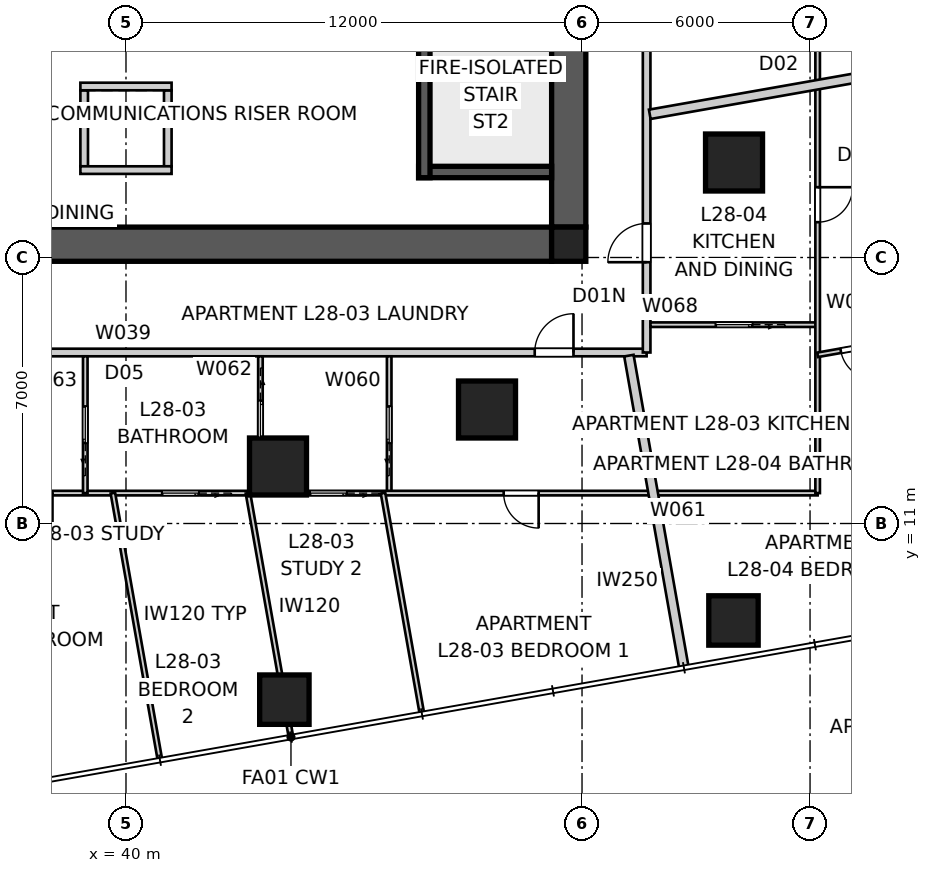
"""IFC4 building model, lengths in metres.
Left out: names, types, materials, properties, quantities, classifications, styles, units other than length and angle.
Written with IfcOpenShell. Run it as: python <this file> out.ifc"""

import sys

from ifc_helpers import new_model, si_unit, direction, frame, frame_2d, origin, origin_2d, place, context, subcontext, project, spatial, polyline, rectangle, outline, extrude, element, fill, save


model = new_model("IFC4")
c1 = context("Model", 3, precision=1e-05, world=origin(), true_north=direction((0.0, 1.0)))
c2 = subcontext(c1, "Body", "Model", "MODEL_VIEW")
j1 = project(units=[si_unit("LENGTHUNIT", "METRE"), si_unit("PLANEANGLEUNIT", "RADIAN")], contexts=[c1])
p1 = place(None, origin())
s1 = spatial("IfcSite", under=j1, at=p1, CompositionType="ELEMENT")
p2 = place(p1, origin())
s2 = spatial("IfcBuilding", under=s1, at=p2, CompositionType="ELEMENT")
p3 = place(p2, frame((0.0, 0.0, 103.2)))
s3 = spatial("IfcBuildingStorey", under=s2, at=p3, CompositionType="ELEMENT", Elevation=103.2)
p4 = place(p3, frame((51.2, 18.35, 0.0), z_axis=(0.0, 0.0, 1.0), x_axis=(-1.0, 0.0, 0.0)))
e1 = element("IfcWall", 1, at=p4, inside=s3, PredefinedType="SHEAR", context=c2, shape_type="SweptSolid", body=[
    extrude(outline(polyline([(0.0, -0.45), (22.4, -0.45), (22.4, -0.025), (22.85, -0.025), (22.85, 0.025), (22.4, 0.025), (22.4, 0.45), (0.0, 0.45), (0.0, 0.025), (-0.45, 0.025), (-0.45, -0.025), (0.0, -0.025), (0.0, -0.45)])), origin(), (0.0, 0.0, 1.0), 3.4),
])
p5 = place(p3, frame((51.65, 18.8, 0.0), z_axis=(0.0, 0.0, 1.0), x_axis=(0.0, 1.0, 0.0)))
e2 = element("IfcWall", 2, at=p5, inside=s3, PredefinedType="SHEAR", context=c2, shape_type="SweptSolid", body=[
    extrude(outline(polyline([(0.0, -0.45), (22.4, -0.45), (22.4, -0.025), (22.85, -0.025), (22.85, 0.025), (22.4, 0.025), (22.4, 0.45), (0.0, 0.45), (0.0, 0.025), (-0.45, 0.025), (-0.45, -0.025), (0.0, -0.025), (0.0, -0.45)])), origin(), (0.0, 0.0, 1.0), 3.4),
])
p6 = place(p5, frame((11.14, 0.0, 0.0)))
e3 = element("IfcOpeningElement", 3, at=p6, cuts=e2, PredefinedType="OPENING", context=c2, shape_type="SweptSolid", body=[
    extrude(rectangle(XDim=1.02, YDim=2.4, at=frame_2d((0.51, 1.2))), frame((0.0, 0.46, 0.0), z_axis=(0.0, -1.0, 0.0), x_axis=(1.0, 0.0, 0.0)), (0.0, 0.0, 1.0), 0.92),
])
p7 = place(p3, frame((47.85, 27.8, 0.0), z_axis=(0.0, 0.0, 1.0), x_axis=(0.0, -1.0, 0.0)))
e4 = element("IfcWall", 4, at=p7, inside=s3, PredefinedType="SHEAR", context=c2, shape_type="SweptSolid", body=[
    extrude(rectangle(XDim=7.7, YDim=0.3, at=frame_2d((3.85, 0.0))), origin(), (0.0, 0.0, 1.0), 3.4),
])
p8 = place(p3, frame((51.2, 20.25, 0.0), z_axis=(0.0, 0.0, 1.0), x_axis=(-1.0, 0.0, 0.0)))
e5 = element("IfcWall", 5, at=p8, inside=s3, PredefinedType="SHEAR", context=c2, shape_type="SweptSolid", body=[
    extrude(rectangle(XDim=3.5, YDim=0.3, at=frame_2d((1.75, 0.0))), origin(), (0.0, 0.0, 1.0), 3.4),
])
for number, where, z_axis, x_axis in (
    (6, (38.9, 22.4, 0.0), (0.0, 0.0, 1.0), (0.0, -1.0, 0.0)),
    (7, (41.1, 22.4, 0.0), (0.0, 0.0, 1.0), (0.0, -1.0, 0.0)),
):
    element("IfcWall", number, at=place(p3, frame(where, z_axis=z_axis, x_axis=x_axis)), inside=s3, PredefinedType="SOLIDWALL", context=c2, shape_type="SweptSolid", body=[
        extrude(rectangle(XDim=2.0, YDim=0.2, at=frame_2d((1.0, 0.0))), origin(), (0.0, 0.0, 1.0), 3.4),
    ])
for number, where, z_axis, x_axis in (
    (8, (38.8, 22.5, 0.0), (0.0, 0.0, 1.0), (1.0, 0.0, 0.0)),
    (9, (38.8, 20.3, 0.0), (0.0, 0.0, 1.0), (1.0, 0.0, 0.0)),
):
    element("IfcWall", number, at=place(p3, frame(where, z_axis=z_axis, x_axis=x_axis)), inside=s3, PredefinedType="SOLIDWALL", context=c2, shape_type="SweptSolid", body=[
        extrude(rectangle(XDim=2.4, YDim=0.2, at=frame_2d((1.2, 0.0))), origin(), (0.0, 0.0, 1.0), 3.4),
    ])
p9 = place(p3, frame((51.65, 18.35, 0.0), z_axis=(0.0, 0.0, 1.0), x_axis=(1.0, 0.0, 0.0)))
e10 = element("IfcColumn", 10, at=p9, inside=s3, PredefinedType="COLUMN", context=c2, shape_type="SweptSolid", body=[
    extrude(rectangle(XDim=0.9, YDim=0.9, at=origin_2d()), origin(), (0.0, 0.0, 1.0), 3.4),
])
for number, where, z_axis, x_axis in (
    (11, (44.167, 6.365, 0.0), (0.0, 0.0, 1.0), (1.0, 0.0, 0.0)),
    (12, (55.985, 8.448, 0.0), (0.0, 0.0, 1.0), (1.0, 0.0, 0.0)),
):
    element("IfcColumn", number, at=place(p3, frame(where, z_axis=z_axis, x_axis=x_axis)), inside=s3, PredefinedType="COLUMN", context=c2, shape_type="SweptSolid", body=[
        extrude(rectangle(XDim=1.3, YDim=1.3, at=origin_2d()), origin(), (0.0, 0.0, 1.0), 3.2),
    ])
for number, where, z_axis, x_axis in (
    (13, (44.0, 12.5, 0.0), (0.0, 0.0, 1.0), (1.0, 0.0, 0.0)),
    (14, (49.5, 14.0, 0.0), (0.0, 0.0, 1.0), (1.0, 0.0, 0.0)),
    (15, (56.0, 20.5, 0.0), (0.0, 0.0, 1.0), (1.0, 0.0, 0.0)),
):
    element("IfcColumn", number, at=place(p3, frame(where, z_axis=z_axis, x_axis=x_axis)), inside=s3, PredefinedType="COLUMN", context=c2, shape_type="SweptSolid", body=[
        extrude(rectangle(XDim=1.5, YDim=1.5, at=origin_2d()), origin(), (0.0, 0.0, 1.0), 3.4),
    ])
p10 = place(p3, frame((26.3, 15.5, 0.0), z_axis=(0.0, 0.0, 1.0), x_axis=(1.0, 0.0, 0.0)))
e16 = element("IfcWall", 16, at=p10, inside=s3, PredefinedType="PARTITIONING", context=c2, shape_type="SweptSolid", body=[
    extrude(rectangle(XDim=27.4, YDim=0.2, at=frame_2d((13.7, 0.0))), origin(), (0.0, 0.0, 1.0), 3.2),
])
p11 = place(p10, frame((24.455, 0.0, 0.0)))
e17 = element("IfcOpeningElement", 17, at=p11, cuts=e16, PredefinedType="OPENING", context=c2, shape_type="SweptSolid", body=[
    extrude(rectangle(XDim=1.02, YDim=2.0, at=frame_2d((0.51, 1.0))), frame((0.0, 0.11, 0.0), z_axis=(0.0, -1.0, 0.0), x_axis=(1.0, 0.0, 0.0)), (0.0, 0.0, 1.0), 0.22),
])
p12 = place(p10, frame((1.765, 0.0, 0.0)))
e18 = element("IfcOpeningElement", 18, at=p12, cuts=e16, PredefinedType="OPENING", context=c2, shape_type="SweptSolid", body=[
    extrude(rectangle(XDim=1.02, YDim=2.0, at=frame_2d((0.51, 1.0))), frame((0.0, 0.11, 0.0), z_axis=(0.0, -1.0, 0.0), x_axis=(1.0, 0.0, 0.0)), (0.0, 0.0, 1.0), 0.22),
])
p13 = place(p3, frame((53.7, 15.5, 0.0), z_axis=(0.0, 0.0, 1.0), x_axis=(0.0, 1.0, 0.0)))
e19 = element("IfcWall", 19, at=p13, inside=s3, PredefinedType="PARTITIONING", context=c2, shape_type="SweptSolid", body=[
    extrude(rectangle(XDim=29.0, YDim=0.2, at=frame_2d((14.5, 0.0))), origin(), (0.0, 0.0, 1.0), 3.2),
])
p14 = place(p13, frame((23.648, 0.0, 0.0)))
e20 = element("IfcOpeningElement", 20, at=p14, cuts=e19, PredefinedType="OPENING", context=c2, shape_type="SweptSolid", body=[
    extrude(rectangle(XDim=1.02, YDim=2.34, at=frame_2d((0.51, 1.17))), frame((0.0, 0.11, 0.0), z_axis=(0.0, -1.0, 0.0), x_axis=(1.0, 0.0, 0.0)), (0.0, 0.0, 1.0), 0.22),
])
p15 = place(p13, frame((2.376, 0.0, 0.0)))
e21 = element("IfcOpeningElement", 21, at=p15, cuts=e19, PredefinedType="OPENING", context=c2, shape_type="SweptSolid", body=[
    extrude(rectangle(XDim=1.02, YDim=2.0, at=frame_2d((0.51, 1.0))), frame((0.0, 0.11, 0.0), z_axis=(0.0, -1.0, 0.0), x_axis=(1.0, 0.0, 0.0)), (0.0, 0.0, 1.0), 0.22),
])
p16 = place(p13, frame((8.092, 0.0, 0.0)))
e22 = element("IfcOpeningElement", 22, at=p16, cuts=e19, PredefinedType="OPENING", context=c2, shape_type="SweptSolid", body=[
    extrude(rectangle(XDim=1.02, YDim=2.34, at=frame_2d((0.51, 1.17))), frame((0.0, 0.11, 0.0), z_axis=(0.0, -1.0, 0.0), x_axis=(1.0, 0.0, 0.0)), (0.0, 0.0, 1.0), 0.22),
])
p17 = place(p3, frame((54.682, 7.203, 0.0), z_axis=(0.0, 0.0, 1.0), x_axis=(-0.173651756605, 0.984807121942, 0.0)))
e23 = element("IfcWall", 23, at=p17, inside=s3, PredefinedType="PARTITIONING", context=c2, shape_type="SweptSolid", body=[
    extrude(rectangle(XDim=8.341, YDim=0.25, at=frame_2d((4.171, 0.0))), origin(), (0.0, 0.0, 1.0), 3.2),
])
p18 = place(p3, frame((66.444, 24.001, 0.0), z_axis=(0.0, 0.0, 1.0), x_axis=(-0.984809355703, -0.173639088111, 0.0)))
e24 = element("IfcWall", 24, at=p18, inside=s3, PredefinedType="PARTITIONING", context=c2, shape_type="SweptSolid", body=[
    extrude(rectangle(XDim=12.857, YDim=0.25, at=frame_2d((6.428, 0.0))), origin(), (0.0, 0.0, 1.0), 3.2),
])
p19 = place(p3, frame((46.926, 11.8, 0.0), z_axis=(0.0, 0.0, 1.0), x_axis=(0.0, 1.0, 0.0)))
e25 = element("IfcWall", 25, at=p19, inside=s3, PredefinedType="PARTITIONING", context=c2, shape_type="SweptSolid", body=[
    extrude(rectangle(XDim=3.6, YDim=0.12, at=frame_2d((1.8, 0.0))), origin(), (0.0, 0.0, 1.0), 3.2),
])
p20 = place(p19, frame((1.32, 0.0, 0.0)))
e26 = element("IfcOpeningElement", 26, at=p20, cuts=e25, PredefinedType="OPENING", context=c2, shape_type="SweptSolid", body=[
    extrude(rectangle(XDim=0.96, YDim=2.1, at=frame_2d((0.48, 1.05))), frame((0.0, 0.07, 0.0), z_axis=(0.0, -1.0, 0.0), x_axis=(1.0, 0.0, 0.0)), (0.0, 0.0, 1.0), 0.14),
])
p21 = place(p3, frame((58.2, 11.8, 0.0), z_axis=(0.0, 0.0, 1.0), x_axis=(-1.0, 0.0, 0.0)))
e27 = element("IfcWall", 27, at=p21, inside=s3, PredefinedType="PARTITIONING", context=c2, shape_type="SweptSolid", body=[
    extrude(rectangle(XDim=25.653, YDim=0.12, at=frame_2d((12.826, 0.0))), origin(), (0.0, 0.0, 1.0), 3.2),
])
p22 = place(p21, frame((7.342, 0.0, 0.0)))
e28 = element("IfcOpeningElement", 28, at=p22, cuts=e27, PredefinedType="OPENING", context=c2, shape_type="SweptSolid", body=[
    extrude(rectangle(XDim=0.92, YDim=2.34, at=frame_2d((0.46, 1.17))), frame((0.0, 0.07, 0.0), z_axis=(0.0, -1.0, 0.0), x_axis=(1.0, 0.0, 0.0)), (0.0, 0.0, 1.0), 0.14),
])
p23 = place(p21, frame((12.394, 0.0, 0.0)))
e29 = element("IfcOpeningElement", 29, at=p23, cuts=e27, PredefinedType="OPENING", context=c2, shape_type="SweptSolid", body=[
    extrude(rectangle(XDim=0.96, YDim=2.1, at=frame_2d((0.48, 1.05))), frame((0.0, 0.07, 0.0), z_axis=(0.0, -1.0, 0.0), x_axis=(1.0, 0.0, 0.0)), (0.0, 0.0, 1.0), 0.14),
])
p24 = place(p21, frame((16.288, 0.0, 0.0)))
e30 = element("IfcOpeningElement", 30, at=p24, cuts=e27, PredefinedType="OPENING", context=c2, shape_type="SweptSolid", body=[
    extrude(rectangle(XDim=0.96, YDim=2.1, at=frame_2d((0.48, 1.05))), frame((0.0, 0.07, 0.0), z_axis=(0.0, -1.0, 0.0), x_axis=(1.0, 0.0, 0.0)), (0.0, 0.0, 1.0), 0.14),
])
p25 = place(p21, frame((20.134, 0.0, 0.0)))
e31 = element("IfcOpeningElement", 31, at=p25, cuts=e27, PredefinedType="OPENING", context=c2, shape_type="SweptSolid", body=[
    extrude(rectangle(XDim=0.92, YDim=2.34, at=frame_2d((0.46, 1.17))), frame((0.0, 0.07, 0.0), z_axis=(0.0, -1.0, 0.0), x_axis=(1.0, 0.0, 0.0)), (0.0, 0.0, 1.0), 0.14),
])
p26 = place(p3, frame((43.538, 15.4, 0.0), z_axis=(0.0, 0.0, 1.0), x_axis=(0.0, -1.0, 0.0)))
e32 = element("IfcWall", 32, at=p26, inside=s3, PredefinedType="PARTITIONING", context=c2, shape_type="SweptSolid", body=[
    extrude(rectangle(XDim=3.6, YDim=0.12, at=frame_2d((1.8, 0.0))), origin(), (0.0, 0.0, 1.0), 3.2),
])
p27 = place(p26, frame((1.17, 0.0, 0.0)))
e33 = element("IfcOpeningElement", 33, at=p27, cuts=e32, PredefinedType="OPENING", context=c2, shape_type="SweptSolid", body=[
    extrude(rectangle(XDim=0.96, YDim=2.1, at=frame_2d((0.48, 1.05))), frame((0.0, 0.07, 0.0), z_axis=(0.0, -1.0, 0.0), x_axis=(1.0, 0.0, 0.0)), (0.0, 0.0, 1.0), 0.14),
])
p28 = place(p3, frame((38.929, 11.8, 0.0), z_axis=(0.0, 0.0, 1.0), x_axis=(0.0, 1.0, 0.0)))
e34 = element("IfcWall", 34, at=p28, inside=s3, PredefinedType="PARTITIONING", context=c2, shape_type="SweptSolid", body=[
    extrude(rectangle(XDim=3.6, YDim=0.12, at=frame_2d((1.8, 0.0))), origin(), (0.0, 0.0, 1.0), 3.2),
])
p29 = place(p28, frame((1.32, 0.0, 0.0)))
e35 = element("IfcOpeningElement", 35, at=p29, cuts=e34, PredefinedType="OPENING", context=c2, shape_type="SweptSolid", body=[
    extrude(rectangle(XDim=0.96, YDim=2.1, at=frame_2d((0.48, 1.05))), frame((0.0, 0.07, 0.0), z_axis=(0.0, -1.0, 0.0), x_axis=(1.0, 0.0, 0.0)), (0.0, 0.0, 1.0), 0.14),
])
p30 = place(p3, frame((39.655, 11.8, 0.0), z_axis=(0.0, 0.0, 1.0), x_axis=(0.17363617165, -0.984809869921, 0.0)))
e36 = element("IfcWall", 36, at=p30, inside=s3, PredefinedType="PARTITIONING", context=c2, shape_type="SweptSolid", body=[
    extrude(rectangle(XDim=7.096, YDim=0.12, at=frame_2d((3.548, 0.0))), origin(), (0.0, 0.0, 1.0), 3.2),
])
p31 = place(p3, frame((47.781, 6.027, 0.0), z_axis=(0.0, 0.0, 1.0), x_axis=(-0.173623777139, 0.984812055172, 0.0)))
e37 = element("IfcWall", 37, at=p31, inside=s3, PredefinedType="PARTITIONING", context=c2, shape_type="SweptSolid", body=[
    extrude(rectangle(XDim=5.862, YDim=0.12, at=frame_2d((2.931, 0.0))), origin(), (0.0, 0.0, 1.0), 3.2),
])
p32 = place(p3, frame((43.209, 11.8, 0.0), z_axis=(0.0, 0.0, 1.0), x_axis=(0.173630564586, -0.984810858511, 0.0)))
e38 = element("IfcWall", 38, at=p32, inside=s3, PredefinedType="PARTITIONING", context=c2, shape_type="SweptSolid", body=[
    extrude(rectangle(XDim=6.479, YDim=0.12, at=frame_2d((3.24, 0.0))), origin(), (0.0, 0.0, 1.0), 3.2),
])
p33 = place(p3, frame((58.2, 16.232, 0.0), z_axis=(0.0, 0.0, 1.0), x_axis=(-1.0, 0.0, 0.0)))
e39 = element("IfcWall", 39, at=p33, inside=s3, PredefinedType="PARTITIONING", context=c2, shape_type="SweptSolid", body=[
    extrude(rectangle(XDim=4.4, YDim=0.12, at=frame_2d((2.2, 0.0))), origin(), (0.0, 0.0, 1.0), 3.2),
])
p34 = place(p33, frame((1.72, 0.0, 0.0)))
e40 = element("IfcOpeningElement", 40, at=p34, cuts=e39, PredefinedType="OPENING", context=c2, shape_type="SweptSolid", body=[
    extrude(rectangle(XDim=0.96, YDim=2.1, at=frame_2d((0.48, 1.05))), frame((0.0, 0.07, 0.0), z_axis=(0.0, -1.0, 0.0), x_axis=(1.0, 0.0, 0.0)), (0.0, 0.0, 1.0), 0.14),
])
p35 = place(p3, frame((58.2, 48.2, 0.0), z_axis=(0.0, 0.0, 1.0), x_axis=(0.0, -1.0, 0.0)))
e41 = element("IfcWall", 41, at=p35, inside=s3, PredefinedType="PARTITIONING", context=c2, shape_type="SweptSolid", body=[
    extrude(rectangle(XDim=36.4, YDim=0.12, at=frame_2d((18.2, 0.0))), origin(), (0.0, 0.0, 1.0), 3.2),
])
p36 = place(p35, frame((5.671, 0.0, 0.0)))
e42 = element("IfcOpeningElement", 42, at=p36, cuts=e41, PredefinedType="OPENING", context=c2, shape_type="SweptSolid", body=[
    extrude(rectangle(XDim=0.92, YDim=2.34, at=frame_2d((0.46, 1.17))), frame((0.0, 0.07, 0.0), z_axis=(0.0, -1.0, 0.0), x_axis=(1.0, 0.0, 0.0)), (0.0, 0.0, 1.0), 0.14),
])
p37 = place(p35, frame((8.83, 0.0, 0.0)))
e43 = element("IfcOpeningElement", 43, at=p37, cuts=e41, PredefinedType="OPENING", context=c2, shape_type="SweptSolid", body=[
    extrude(rectangle(XDim=0.92, YDim=2.34, at=frame_2d((0.46, 1.17))), frame((0.0, 0.07, 0.0), z_axis=(0.0, -1.0, 0.0), x_axis=(1.0, 0.0, 0.0)), (0.0, 0.0, 1.0), 0.14),
])
p38 = place(p35, frame((28.35, 0.0, 0.0)))
e44 = element("IfcOpeningElement", 44, at=p38, cuts=e41, PredefinedType="OPENING", context=c2, shape_type="SweptSolid", body=[
    extrude(rectangle(XDim=0.92, YDim=2.34, at=frame_2d((0.46, 1.17))), frame((0.0, 0.07, 0.0), z_axis=(0.0, -1.0, 0.0), x_axis=(1.0, 0.0, 0.0)), (0.0, 0.0, 1.0), 0.14),
])
p39 = place(p35, frame((23.39, 0.0, 0.0)))
e45 = element("IfcOpeningElement", 45, at=p39, cuts=e41, PredefinedType="OPENING", context=c2, shape_type="SweptSolid", body=[
    extrude(rectangle(XDim=0.92, YDim=2.34, at=frame_2d((0.46, 1.17))), frame((0.0, 0.07, 0.0), z_axis=(0.0, -1.0, 0.0), x_axis=(1.0, 0.0, 0.0)), (0.0, 0.0, 1.0), 0.14),
])
p40 = place(p35, frame((19.918, 0.0, 0.0)))
e46 = element("IfcOpeningElement", 46, at=p40, cuts=e41, PredefinedType="OPENING", context=c2, shape_type="SweptSolid", body=[
    extrude(rectangle(XDim=0.96, YDim=2.1, at=frame_2d((0.48, 1.05))), frame((0.0, 0.07, 0.0), z_axis=(0.0, -1.0, 0.0), x_axis=(1.0, 0.0, 0.0)), (0.0, 0.0, 1.0), 0.14),
])
p41 = place(p35, frame((16.313, 0.0, 0.0)))
e47 = element("IfcOpeningElement", 47, at=p41, cuts=e41, PredefinedType="OPENING", context=c2, shape_type="SweptSolid", body=[
    extrude(rectangle(XDim=0.96, YDim=2.1, at=frame_2d((0.48, 1.05))), frame((0.0, 0.07, 0.0), z_axis=(0.0, -1.0, 0.0), x_axis=(1.0, 0.0, 0.0)), (0.0, 0.0, 1.0), 0.14),
])
p42 = place(p3, frame((67.62, 17.1, 0.0), z_axis=(0.0, 0.0, 1.0), x_axis=(-0.984808730291, -0.173642635155, 0.0)))
e48 = element("IfcWall", 48, at=p42, inside=s3, PredefinedType="PARTITIONING", context=c2, shape_type="SweptSolid", body=[
    extrude(rectangle(XDim=9.565, YDim=0.12, at=frame_2d((4.782, 0.0))), origin(), (0.0, 0.0, 1.0), 3.2),
])
p43 = place(p42, frame((1.525, 0.0, 0.0)))
e49 = element("IfcOpeningElement", 49, at=p43, cuts=e48, PredefinedType="OPENING", context=c2, shape_type="SweptSolid", body=[
    extrude(rectangle(XDim=0.92, YDim=2.34, at=frame_2d((0.46, 1.17))), frame((0.0, 0.07, 0.0), z_axis=(0.0, -1.0, 0.0), x_axis=(1.0, 0.0, 0.0)), (0.0, 0.0, 1.0), 0.14),
])
p44 = place(p42, frame((5.25, 0.0, 0.0)))
e50 = element("IfcOpeningElement", 50, at=p44, cuts=e48, PredefinedType="OPENING", context=c2, shape_type="SweptSolid", body=[
    extrude(rectangle(XDim=0.92, YDim=2.34, at=frame_2d((0.46, 1.17))), frame((0.0, 0.07, 0.0), z_axis=(0.0, -1.0, 0.0), x_axis=(1.0, 0.0, 0.0)), (0.0, 0.0, 1.0), 0.14),
])
p45 = place(p42, frame((8.028, 0.0, 0.0)))
e51 = element("IfcOpeningElement", 51, at=p45, cuts=e48, PredefinedType="OPENING", context=c2, shape_type="SweptSolid", body=[
    extrude(rectangle(XDim=0.92, YDim=2.0, at=frame_2d((0.46, 1.0))), frame((0.0, 0.07, 0.0), z_axis=(0.0, -1.0, 0.0), x_axis=(1.0, 0.0, 0.0)), (0.0, 0.0, 1.0), 0.14),
])
p46 = place(p11, origin())
e52 = element("IfcDoor", 52, at=p46, inside=s3, OperationType="SINGLE_SWING_RIGHT", PredefinedType="DOOR", context=c2, shape_type="SweptSolid", body=[
    extrude(rectangle(XDim=1.02, YDim=2.0, at=frame_2d((0.51, 1.0))), frame((0.0, 0.025, 0.0), z_axis=(0.0, -1.0, 0.0), x_axis=(1.0, 0.0, 0.0)), (0.0, 0.0, 1.0), 0.05),
])
fill(e17, e52)
p47 = place(p15, origin())
e53 = element("IfcDoor", 53, at=p47, inside=s3, OperationType="SINGLE_SWING_LEFT", PredefinedType="DOOR", context=c2, shape_type="SweptSolid", body=[
    extrude(rectangle(XDim=1.02, YDim=2.0, at=frame_2d((0.51, 1.0))), frame((0.0, 0.025, 0.0), z_axis=(0.0, -1.0, 0.0), x_axis=(1.0, 0.0, 0.0)), (0.0, 0.0, 1.0), 0.05),
])
fill(e21, e53)
p48 = place(p22, origin())
e54 = element("IfcDoor", 54, at=p48, inside=s3, OperationType="SINGLE_SWING_LEFT", PredefinedType="DOOR", context=c2, shape_type="SweptSolid", body=[
    extrude(rectangle(XDim=0.92, YDim=2.34, at=frame_2d((0.46, 1.17))), frame((0.0, 0.025, 0.0), z_axis=(0.0, -1.0, 0.0), x_axis=(1.0, 0.0, 0.0)), (0.0, 0.0, 1.0), 0.05),
])
fill(e28, e54)
p49 = place(p20, origin())
e55 = element("IfcDoor", 55, at=p49, inside=s3, OperationType="SLIDING_TO_LEFT", PredefinedType="DOOR", context=c2, shape_type="SweptSolid", body=[
    extrude(rectangle(XDim=0.96, YDim=2.1, at=frame_2d((0.48, 1.05))), frame((0.0, 0.025, 0.0), z_axis=(0.0, -1.0, 0.0), x_axis=(1.0, 0.0, 0.0)), (0.0, 0.0, 1.0), 0.05),
])
fill(e26, e55)
p50 = place(p38, origin())
e56 = element("IfcDoor", 56, at=p50, inside=s3, OperationType="SINGLE_SWING_LEFT", PredefinedType="DOOR", context=c2, shape_type="SweptSolid", body=[
    extrude(rectangle(XDim=0.92, YDim=2.34, at=frame_2d((0.46, 1.17))), frame((0.0, 0.025, 0.0), z_axis=(0.0, -1.0, 0.0), x_axis=(1.0, 0.0, 0.0)), (0.0, 0.0, 1.0), 0.05),
])
fill(e44, e56)
p51 = place(p34, origin())
e57 = element("IfcDoor", 57, at=p51, inside=s3, OperationType="SLIDING_TO_LEFT", PredefinedType="DOOR", context=c2, shape_type="SweptSolid", body=[
    extrude(rectangle(XDim=0.96, YDim=2.1, at=frame_2d((0.48, 1.05))), frame((0.0, 0.025, 0.0), z_axis=(0.0, -1.0, 0.0), x_axis=(1.0, 0.0, 0.0)), (0.0, 0.0, 1.0), 0.05),
])
fill(e40, e57)
p52 = place(p27, origin())
e58 = element("IfcDoor", 58, at=p52, inside=s3, OperationType="SLIDING_TO_LEFT", PredefinedType="DOOR", context=c2, shape_type="SweptSolid", body=[
    extrude(rectangle(XDim=0.96, YDim=2.1, at=frame_2d((0.48, 1.05))), frame((0.0, 0.025, 0.0), z_axis=(0.0, -1.0, 0.0), x_axis=(1.0, 0.0, 0.0)), (0.0, 0.0, 1.0), 0.05),
])
fill(e33, e58)
p53 = place(p23, origin())
e59 = element("IfcDoor", 59, at=p53, inside=s3, OperationType="SLIDING_TO_LEFT", PredefinedType="DOOR", context=c2, shape_type="SweptSolid", body=[
    extrude(rectangle(XDim=0.96, YDim=2.1, at=frame_2d((0.48, 1.05))), frame((0.0, 0.025, 0.0), z_axis=(0.0, -1.0, 0.0), x_axis=(1.0, 0.0, 0.0)), (0.0, 0.0, 1.0), 0.05),
])
fill(e29, e59)
p54 = place(p45, origin())
e60 = element("IfcDoor", 60, at=p54, inside=s3, OperationType="SINGLE_SWING_LEFT", PredefinedType="DOOR", context=c2, shape_type="SweptSolid", body=[
    extrude(rectangle(XDim=0.92, YDim=2.0, at=frame_2d((0.46, 1.0))), frame((0.0, 0.025, 0.0), z_axis=(0.0, -1.0, 0.0), x_axis=(1.0, 0.0, 0.0)), (0.0, 0.0, 1.0), 0.05),
])
fill(e51, e60)
p55 = place(p24, origin())
e61 = element("IfcDoor", 61, at=p55, inside=s3, OperationType="SLIDING_TO_LEFT", PredefinedType="DOOR", context=c2, shape_type="SweptSolid", body=[
    extrude(rectangle(XDim=0.96, YDim=2.1, at=frame_2d((0.48, 1.05))), frame((0.0, 0.025, 0.0), z_axis=(0.0, -1.0, 0.0), x_axis=(1.0, 0.0, 0.0)), (0.0, 0.0, 1.0), 0.05),
])
fill(e30, e61)
p56 = place(p29, origin())
e62 = element("IfcDoor", 62, at=p56, inside=s3, OperationType="SLIDING_TO_LEFT", PredefinedType="DOOR", context=c2, shape_type="SweptSolid", body=[
    extrude(rectangle(XDim=0.96, YDim=2.1, at=frame_2d((0.48, 1.05))), frame((0.0, 0.025, 0.0), z_axis=(0.0, -1.0, 0.0), x_axis=(1.0, 0.0, 0.0)), (0.0, 0.0, 1.0), 0.05),
])
fill(e35, e62)
p57 = place(p25, origin())
e63 = element("IfcDoor", 63, at=p57, inside=s3, OperationType="SINGLE_SWING_LEFT", PredefinedType="DOOR", context=c2, shape_type="SweptSolid", body=[
    extrude(rectangle(XDim=0.92, YDim=2.34, at=frame_2d((0.46, 1.17))), frame((0.0, 0.025, 0.0), z_axis=(0.0, -1.0, 0.0), x_axis=(1.0, 0.0, 0.0)), (0.0, 0.0, 1.0), 0.05),
])
fill(e31, e63)
save(model, sys.argv[1])
